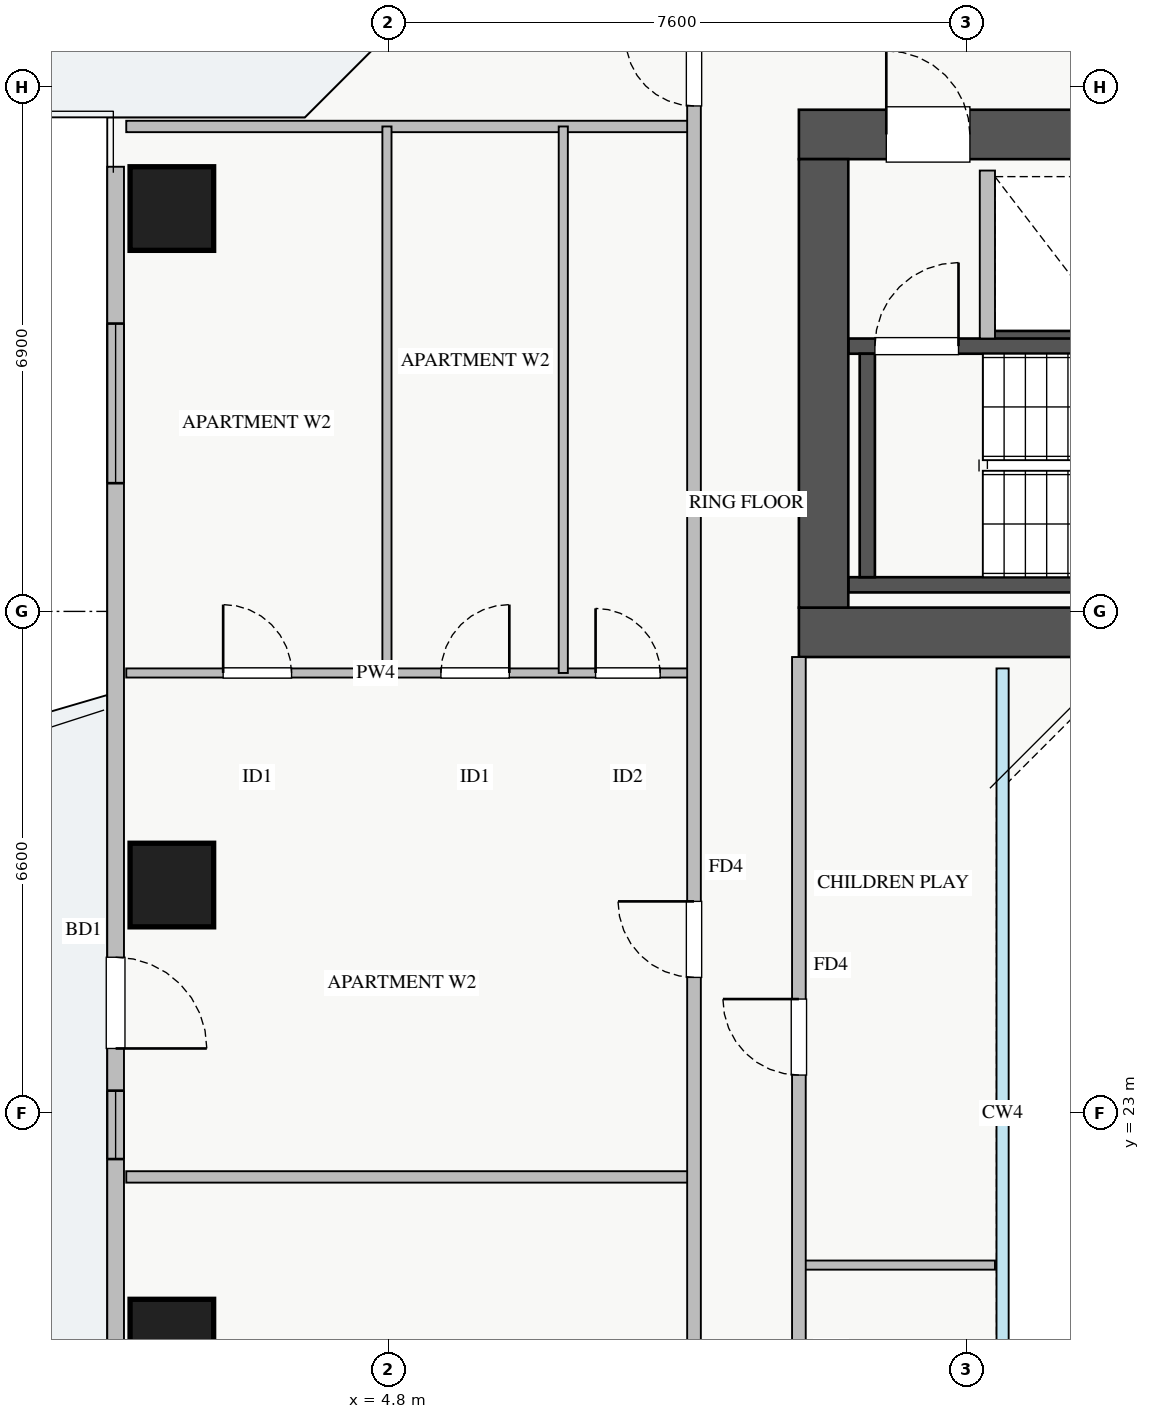
"""IFC4 building model, lengths in metres.
Left out: names, types, materials, properties, quantities, classifications, styles, units other than length and angle.
Written with IfcOpenShell. Run it as: python <this file> out.ifc"""

import sys

from ifc_helpers import new_model, si_unit, direction, frame, frame_2d, origin, origin_2d, place, context, subcontext, project, spatial, rectangle, extrude, source, transform, mapped, element, fill, save


model = new_model("IFC4")
c1 = context("Model", 3, precision=1e-05, world=origin(), true_north=direction((0.0, 1.0)))
c2 = subcontext(c1, "Body", "Model", "MODEL_VIEW")
j1 = project(units=[si_unit("LENGTHUNIT", "METRE"), si_unit("PLANEANGLEUNIT", "RADIAN")], contexts=[c1])
p1 = place(None, origin())
s1 = spatial("IfcSite", under=j1, at=p1, CompositionType="ELEMENT")
p2 = place(p1, origin())
s2 = spatial("IfcBuilding", under=s1, at=p2, CompositionType="ELEMENT")
p3 = place(p2, frame((0.0, 0.0, 132.75)))
s3 = spatial("IfcBuildingStorey", under=s2, at=p3, CompositionType="ELEMENT", Elevation=132.75)
p4 = place(p3, frame((12.68, 33.2, 0.0), z_axis=(0.0, 0.0, 1.0), x_axis=(1.0, 0.0, 0.0)))
e1 = element("IfcWall", 1, at=p4, inside=s3, PredefinedType="SHEAR", context=c2, shape_type="SweptSolid", body=[
    extrude(rectangle(XDim=1.94, YDim=0.18, at=frame_2d((0.97, 0.0))), origin(), (0.0, 0.0, 1.0), 3.07),
])
p5 = place(p3, frame((10.85, 29.95, 0.0), z_axis=(0.0, 0.0, 1.0), x_axis=(1.0, 0.0, 0.0)))
e2 = element("IfcWall", 2, at=p5, inside=s3, PredefinedType="SHEAR", context=c2, shape_type="SweptSolid", body=[
    extrude(rectangle(XDim=7.3, YDim=0.2, at=frame_2d((3.65, 0.0))), origin(), (0.0, 0.0, 1.0), 3.25),
])
p6 = place(p3, frame((10.85, 33.09, 0.0), z_axis=(0.0, 0.0, 1.0), x_axis=(1.0, 0.0, 0.0)))
e3 = element("IfcWall", 3, at=p6, inside=s3, PredefinedType="SHEAR", context=c2, shape_type="SweptSolid", body=[
    extrude(rectangle(XDim=7.3, YDim=0.2, at=frame_2d((3.65, 0.0))), origin(), (0.0, 0.0, 1.0), 3.25),
])
p7 = place(p6, frame((0.35, 0.0, 0.0)))
e4 = element("IfcOpeningElement", 4, at=p7, cuts=e3, PredefinedType="OPENING", context=c2, shape_type="SweptSolid", body=[
    extrude(rectangle(XDim=1.1, YDim=2.05, at=frame_2d((0.55, 1.025))), frame((0.0, 0.11, 0.0), z_axis=(0.0, -1.0, 0.0), x_axis=(1.0, 0.0, 0.0)), (0.0, 0.0, 1.0), 0.22),
])
p8 = place(p3, frame((11.1, 30.05, 0.0), z_axis=(0.0, 0.0, 1.0), x_axis=(0.0, 1.0, 0.0)))
e5 = element("IfcWall", 5, at=p8, inside=s3, PredefinedType="SHEAR", context=c2, shape_type="SweptSolid", body=[
    extrude(rectangle(XDim=2.94, YDim=0.2, at=frame_2d((1.47, 0.0))), origin(), (0.0, 0.0, 1.0), 3.25),
])
p9 = place(p3, frame((10.2, 29.325, 0.0), z_axis=(0.0, 0.0, 1.0), x_axis=(1.0, 0.0, 0.0)))
e6 = element("IfcWall", 6, at=p9, inside=s3, PredefinedType="SHEAR", context=c2, shape_type="SweptSolid", body=[
    extrude(rectangle(XDim=17.6, YDim=0.65, at=frame_2d((8.8, 0.0))), origin(), (0.0, 0.0, 1.0), 3.25),
])
p10 = place(p3, frame((10.2, 35.875, 0.0), z_axis=(0.0, 0.0, 1.0), x_axis=(1.0, 0.0, 0.0)))
e7 = element("IfcWall", 7, at=p10, inside=s3, PredefinedType="SHEAR", context=c2, shape_type="SweptSolid", body=[
    extrude(rectangle(XDim=17.6, YDim=0.65, at=frame_2d((8.8, 0.0))), origin(), (0.0, 0.0, 1.0), 3.25),
])
p11 = place(p10, frame((1.15, 0.0, 0.0)))
e8 = element("IfcOpeningElement", 8, at=p11, cuts=e7, PredefinedType="OPENING", context=c2, shape_type="SweptSolid", body=[
    extrude(rectangle(XDim=1.1, YDim=2.05, at=frame_2d((0.55, 1.025))), frame((0.0, 0.335, 0.0), z_axis=(0.0, -1.0, 0.0), x_axis=(1.0, 0.0, 0.0)), (0.0, 0.0, 1.0), 0.67),
])
p12 = place(p10, frame((8.3, 0.0, 0.0)))
e9 = element("IfcOpeningElement", 9, at=p12, cuts=e7, PredefinedType="OPENING", context=c2, shape_type="SweptSolid", body=[
    extrude(rectangle(XDim=1.1, YDim=2.05, at=frame_2d((0.55, 1.025))), frame((0.0, 0.335, 0.0), z_axis=(0.0, -1.0, 0.0), x_axis=(1.0, 0.0, 0.0)), (0.0, 0.0, 1.0), 0.67),
])
p13 = place(p10, frame((4.9, 0.0, 0.0)))
e10 = element("IfcOpeningElement", 10, at=p13, cuts=e7, PredefinedType="OPENING", context=c2, shape_type="SweptSolid", body=[
    extrude(rectangle(XDim=1.1, YDim=2.05, at=frame_2d((0.55, 1.025))), frame((0.0, 0.335, 0.0), z_axis=(0.0, -1.0, 0.0), x_axis=(1.0, 0.0, 0.0)), (0.0, 0.0, 1.0), 0.67),
])
p14 = place(p10, frame((14.74, 0.0, 0.0)))
e11 = element("IfcOpeningElement", 11, at=p14, cuts=e7, PredefinedType="OPENING", context=c2, shape_type="SweptSolid", body=[
    extrude(rectangle(XDim=1.0, YDim=2.05, at=frame_2d((0.5, 1.025))), frame((0.0, 0.335, 0.0), z_axis=(0.0, -1.0, 0.0), x_axis=(1.0, 0.0, 0.0)), (0.0, 0.0, 1.0), 0.67),
])
p15 = place(p10, frame((10.005, 0.0, 0.0)))
e12 = element("IfcOpeningElement", 12, at=p15, cuts=e7, PredefinedType="OPENING", context=c2, shape_type="SweptSolid", body=[
    extrude(rectangle(XDim=1.0, YDim=2.05, at=frame_2d((0.5, 1.025))), frame((0.0, 0.335, 0.0), z_axis=(0.0, -1.0, 0.0), x_axis=(1.0, 0.0, 0.0)), (0.0, 0.0, 1.0), 0.67),
])
p16 = place(p10, frame((11.55, 0.0, 0.0)))
e13 = element("IfcOpeningElement", 13, at=p16, cuts=e7, PredefinedType="OPENING", context=c2, shape_type="SweptSolid", body=[
    extrude(rectangle(XDim=1.0, YDim=2.05, at=frame_2d((0.5, 1.025))), frame((0.0, 0.335, 0.0), z_axis=(0.0, -1.0, 0.0), x_axis=(1.0, 0.0, 0.0)), (0.0, 0.0, 1.0), 0.67),
])
p17 = place(p10, frame((13.215, 0.0, 0.0)))
e14 = element("IfcOpeningElement", 14, at=p17, cuts=e7, PredefinedType="OPENING", context=c2, shape_type="SweptSolid", body=[
    extrude(rectangle(XDim=1.0, YDim=2.05, at=frame_2d((0.5, 1.025))), frame((0.0, 0.335, 0.0), z_axis=(0.0, -1.0, 0.0), x_axis=(1.0, 0.0, 0.0)), (0.0, 0.0, 1.0), 0.67),
])
p18 = place(p3, frame((10.525, 29.65, 0.0), z_axis=(0.0, 0.0, 1.0), x_axis=(0.0, 1.0, 0.0)))
e15 = element("IfcWall", 15, at=p18, inside=s3, PredefinedType="SHEAR", context=c2, shape_type="SweptSolid", body=[
    extrude(rectangle(XDim=5.9, YDim=0.65, at=frame_2d((2.95, 0.0))), origin(), (0.0, 0.0, 1.0), 3.25),
])
m1 = source(origin(), c2, "Body", "SweptSolid", [
    extrude(rectangle(XDim=1.1, YDim=1.1, at=origin_2d()), origin(), (0.0, 0.0, 1.0), 3.25),
])
for number, where, z_axis, x_axis in (
    (16, (1.95, 34.9, 0.0), (0.0, 0.0, 1.0), (1.0, 0.0, 0.0)),
    (17, (1.95, 26.0, 0.0), (0.0, 0.0, 1.0), (1.0, 0.0, 0.0)),
    (18, (1.95, 20.0, 0.0), (0.0, 0.0, 1.0), (1.0, 0.0, 0.0)),
):
    element("IfcColumn", number, at=place(p3, frame(where, z_axis=z_axis, x_axis=x_axis)), inside=s3, PredefinedType="COLUMN", context=c2, shape_type="MappedRepresentation", body=[
        mapped(m1, transform((0.0, 0.0, 0.0), x_axis=(1.0, 0.0, 0.0), y_axis=(0.0, 1.0, 0.0), z_axis=(0.0, 0.0, 1.0), scale=1.0)),
    ])
p19 = place(p3, frame((1.21, 10.55, 0.0), z_axis=(0.0, 0.0, 1.0), x_axis=(0.0, 1.0, 0.0)))
e19 = element("IfcWall", 19, at=p19, inside=s3, PredefinedType="STANDARD", context=c2, shape_type="SweptSolid", body=[
    extrude(rectangle(XDim=24.9, YDim=0.22, at=frame_2d((12.45, 0.0))), origin(), (0.0, 0.0, 1.0), 2.61),
])
p20 = place(p19, frame((13.3, 0.0, 0.0)))
e20 = element("IfcOpeningElement", 20, at=p20, cuts=e19, PredefinedType="OPENING", context=c2, shape_type="SweptSolid", body=[
    extrude(rectangle(XDim=1.2, YDim=2.1, at=frame_2d((0.6, 1.05))), frame((0.0, 0.12, 0.0), z_axis=(0.0, -1.0, 0.0), x_axis=(1.0, 0.0, 0.0)), (0.0, 0.0, 1.0), 0.24),
])
p21 = place(p19, frame((1.912, 0.0, 0.9)))
e21 = element("IfcOpeningElement", 21, at=p21, cuts=e19, PredefinedType="OPENING", context=c2, shape_type="SweptSolid", body=[
    extrude(rectangle(XDim=2.4, YDim=1.48, at=frame_2d((1.2, 0.74))), frame((0.0, 0.12, 0.0), z_axis=(0.0, -1.0, 0.0), x_axis=(1.0, 0.0, 0.0)), (0.0, 0.0, 1.0), 0.24),
])
p22 = place(p19, frame((20.737, 0.0, 0.9)))
e22 = element("IfcOpeningElement", 22, at=p22, cuts=e19, PredefinedType="OPENING", context=c2, shape_type="SweptSolid", body=[
    extrude(rectangle(XDim=2.1, YDim=1.48, at=frame_2d((1.05, 0.74))), frame((0.0, 0.12, 0.0), z_axis=(0.0, -1.0, 0.0), x_axis=(1.0, 0.0, 0.0)), (0.0, 0.0, 1.0), 0.24),
])
p23 = place(p19, frame((11.845, 0.0, 0.9)))
e23 = element("IfcOpeningElement", 23, at=p23, cuts=e19, PredefinedType="OPENING", context=c2, shape_type="SweptSolid", body=[
    extrude(rectangle(XDim=0.9, YDim=1.2, at=frame_2d((0.45, 0.6))), frame((0.0, 0.12, 0.0), z_axis=(0.0, -1.0, 0.0), x_axis=(1.0, 0.0, 0.0)), (0.0, 0.0, 1.0), 0.24),
])
p24 = place(p3, frame((12.68, 33.19, 0.0), z_axis=(0.0, 0.0, 1.0), x_axis=(0.0, 1.0, 0.0)))
e24 = element("IfcWall", 24, at=p24, inside=s3, PredefinedType="PARTITIONING", context=c2, shape_type="SweptSolid", body=[
    extrude(rectangle(XDim=2.21, YDim=0.2, at=frame_2d((1.105, 0.0))), origin(), (0.0, 0.0, 1.0), 3.07),
])
p25 = place(p3, frame((1.35, 35.98, 0.0), z_axis=(0.0, 0.0, 1.0), x_axis=(1.0, 0.0, 0.0)))
e25 = element("IfcWall", 25, at=p25, inside=s3, PredefinedType="PARTITIONING", context=c2, shape_type="SweptSolid", body=[
    extrude(rectangle(XDim=7.47, YDim=0.15, at=frame_2d((3.735, 0.0))), origin(), (0.0, 0.0, 1.0), 3.07),
])
p26 = place(p3, frame((1.35, 28.79, 0.0), z_axis=(0.0, 0.0, 1.0), x_axis=(1.0, 0.0, 0.0)))
e26 = element("IfcWall", 26, at=p26, inside=s3, PredefinedType="PLUMBINGWALL", context=c2, shape_type="SweptSolid", body=[
    extrude(rectangle(XDim=7.47, YDim=0.12, at=frame_2d((3.735, 0.0))), origin(), (0.0, 0.0, 1.0), 3.07),
])
p27 = place(p26, frame((1.275, 0.0, 0.0)))
e27 = element("IfcOpeningElement", 27, at=p27, cuts=e26, PredefinedType="OPENING", context=c2, shape_type="SweptSolid", body=[
    extrude(rectangle(XDim=0.9, YDim=2.05, at=frame_2d((0.45, 1.025))), frame((0.0, 0.07, 0.0), z_axis=(0.0, -1.0, 0.0), x_axis=(1.0, 0.0, 0.0)), (0.0, 0.0, 1.0), 0.14),
])
p28 = place(p26, frame((4.14, 0.0, 0.0)))
e28 = element("IfcOpeningElement", 28, at=p28, cuts=e26, PredefinedType="OPENING", context=c2, shape_type="SweptSolid", body=[
    extrude(rectangle(XDim=0.9, YDim=2.05, at=frame_2d((0.45, 1.025))), frame((0.0, 0.07, 0.0), z_axis=(0.0, -1.0, 0.0), x_axis=(1.0, 0.0, 0.0)), (0.0, 0.0, 1.0), 0.14),
])
p29 = place(p26, frame((6.175, 0.0, 0.0)))
e29 = element("IfcOpeningElement", 29, at=p29, cuts=e26, PredefinedType="OPENING", context=c2, shape_type="SweptSolid", body=[
    extrude(rectangle(XDim=0.85, YDim=2.05, at=frame_2d((0.425, 1.025))), frame((0.0, 0.07, 0.0), z_axis=(0.0, -1.0, 0.0), x_axis=(1.0, 0.0, 0.0)), (0.0, 0.0, 1.0), 0.14),
])
p30 = place(p3, frame((4.78, 28.79, 0.0), z_axis=(0.0, 0.0, 1.0), x_axis=(0.0, 1.0, 0.0)))
e30 = element("IfcWall", 30, at=p30, inside=s3, PredefinedType="PLUMBINGWALL", context=c2, shape_type="SweptSolid", body=[
    extrude(rectangle(XDim=7.19, YDim=0.12, at=frame_2d((3.595, 0.0))), origin(), (0.0, 0.0, 1.0), 3.07),
])
p31 = place(p3, frame((7.1, 28.79, 0.0), z_axis=(0.0, 0.0, 1.0), x_axis=(0.0, 1.0, 0.0)))
e31 = element("IfcWall", 31, at=p31, inside=s3, PredefinedType="PLUMBINGWALL", context=c2, shape_type="SweptSolid", body=[
    extrude(rectangle(XDim=7.19, YDim=0.12, at=frame_2d((3.595, 0.0))), origin(), (0.0, 0.0, 1.0), 2.577),
])
p32 = place(p3, frame((1.35, 22.16, 0.0), z_axis=(0.0, 0.0, 1.0), x_axis=(1.0, 0.0, 0.0)))
e32 = element("IfcWall", 32, at=p32, inside=s3, PredefinedType="PARTITIONING", context=c2, shape_type="SweptSolid", body=[
    extrude(rectangle(XDim=7.47, YDim=0.15, at=frame_2d((3.735, 0.0))), origin(), (0.0, 0.0, 1.0), 3.07),
])
p33 = place(p3, frame((8.82, 8.31, 0.0), z_axis=(0.0, 0.0, 1.0), x_axis=(0.0, 1.0, 0.0)))
e33 = element("IfcWall", 33, at=p33, inside=s3, PredefinedType="PARTITIONING", context=c2, shape_type="SweptSolid", body=[
    extrude(rectangle(XDim=29.13, YDim=0.18, at=frame_2d((14.565, 0.0))), origin(), (0.0, 0.0, 1.0), 3.07),
])
p34 = place(p33, frame((27.94, 0.0, 0.0)))
e34 = element("IfcOpeningElement", 34, at=p34, cuts=e33, PredefinedType="OPENING", context=c2, shape_type="SweptSolid", body=[
    extrude(rectangle(XDim=0.9, YDim=2.05, at=frame_2d((0.45, 1.025))), frame((0.0, 0.1, 0.0), z_axis=(0.0, -1.0, 0.0), x_axis=(1.0, 0.0, 0.0)), (0.0, 0.0, 1.0), 0.2),
])
p35 = place(p33, frame((0.24, 0.0, 0.0)))
e35 = element("IfcOpeningElement", 35, at=p35, cuts=e33, PredefinedType="OPENING", context=c2, shape_type="SweptSolid", body=[
    extrude(rectangle(XDim=0.9, YDim=2.05, at=frame_2d((0.45, 1.025))), frame((0.0, 0.1, 0.0), z_axis=(0.0, -1.0, 0.0), x_axis=(1.0, 0.0, 0.0)), (0.0, 0.0, 1.0), 0.2),
])
p36 = place(p33, frame((7.105, 0.0, 0.0)))
e36 = element("IfcOpeningElement", 36, at=p36, cuts=e33, PredefinedType="OPENING", context=c2, shape_type="SweptSolid", body=[
    extrude(rectangle(XDim=1.0, YDim=2.05, at=frame_2d((0.5, 1.025))), frame((0.0, 0.1, 0.0), z_axis=(0.0, -1.0, 0.0), x_axis=(1.0, 0.0, 0.0)), (0.0, 0.0, 1.0), 0.2),
])
p37 = place(p33, frame((16.475, 0.0, 0.0)))
e37 = element("IfcOpeningElement", 37, at=p37, cuts=e33, PredefinedType="OPENING", context=c2, shape_type="SweptSolid", body=[
    extrude(rectangle(XDim=1.0, YDim=2.05, at=frame_2d((0.5, 1.025))), frame((0.0, 0.1, 0.0), z_axis=(0.0, -1.0, 0.0), x_axis=(1.0, 0.0, 0.0)), (0.0, 0.0, 1.0), 0.2),
])
p38 = place(p3, frame((10.2, 21.0, 0.0), z_axis=(0.0, 0.0, 1.0), x_axis=(1.0, 0.0, 0.0)))
e38 = element("IfcWall", 38, at=p38, inside=s3, PredefinedType="PLUMBINGWALL", context=c2, shape_type="SweptSolid", body=[
    extrude(rectangle(XDim=2.58, YDim=0.12, at=frame_2d((1.29, 0.0))), origin(), (0.0, 0.0, 1.0), 3.07),
])
p39 = place(p3, frame((10.2, 17.0, 0.0), z_axis=(0.0, 0.0, 1.0), x_axis=(0.0, 1.0, 0.0)))
e39 = element("IfcWall", 39, at=p39, inside=s3, PredefinedType="PARTITIONING", context=c2, shape_type="SweptSolid", body=[
    extrude(rectangle(XDim=12.0, YDim=0.18, at=frame_2d((6.0, 0.0))), origin(), (0.0, 0.0, 1.0), 3.07),
])
p40 = place(p39, frame((1.5, 0.0, 0.0)))
e40 = element("IfcOpeningElement", 40, at=p40, cuts=e39, PredefinedType="OPENING", context=c2, shape_type="SweptSolid", body=[
    extrude(rectangle(XDim=0.85, YDim=2.05, at=frame_2d((0.425, 1.025))), frame((0.0, 0.1, 0.0), z_axis=(0.0, -1.0, 0.0), x_axis=(1.0, 0.0, 0.0)), (0.0, 0.0, 1.0), 0.2),
])
p41 = place(p39, frame((6.5, 0.0, 0.0)))
e41 = element("IfcOpeningElement", 41, at=p41, cuts=e39, PredefinedType="OPENING", context=c2, shape_type="SweptSolid", body=[
    extrude(rectangle(XDim=1.0, YDim=2.05, at=frame_2d((0.5, 1.025))), frame((0.0, 0.1, 0.0), z_axis=(0.0, -1.0, 0.0), x_axis=(1.0, 0.0, 0.0)), (0.0, 0.0, 1.0), 0.2),
])
m2 = source(origin(), c2, "Body", "SweptSolid", [
    extrude(rectangle(XDim=1.2, YDim=2.1, at=frame_2d((0.6, 1.05))), frame((0.0, 0.025, 0.0), z_axis=(0.0, -1.0, 0.0), x_axis=(1.0, 0.0, 0.0)), (0.0, 0.0, 1.0), 0.05),
])
p42 = place(p20, frame((1.2, 0.0, 0.0), z_axis=(0.0, 0.0, 1.0), x_axis=(-1.0, 0.0, 0.0)))
e42 = element("IfcDoor", 42, at=p42, inside=s3, OperationType="SINGLE_SWING_LEFT", PredefinedType="DOOR", context=c2, shape_type="MappedRepresentation", body=[
    mapped(m2, transform((0.0, 0.0, 0.0), x_axis=(1.0, 0.0, 0.0), y_axis=(0.0, 1.0, 0.0), z_axis=(0.0, 0.0, 1.0), scale=1.0)),
])
fill(e20, e42)
m3 = source(origin(), c2, "Body", "SweptSolid", [
    extrude(rectangle(XDim=2.1, YDim=1.48, at=frame_2d((1.05, 0.74))), frame((0.0, 0.03, 0.0), z_axis=(0.0, -1.0, 0.0), x_axis=(1.0, 0.0, 0.0)), (0.0, 0.0, 1.0), 0.06),
])
p43 = place(p22, origin())
e43 = element("IfcWindow", 43, at=p43, inside=s3, PartitioningType="TRIPLE_PANEL_VERTICAL", PredefinedType="WINDOW", context=c2, shape_type="MappedRepresentation", body=[
    mapped(m3, transform((0.0, 0.0, 0.0), x_axis=(1.0, 0.0, 0.0), y_axis=(0.0, 1.0, 0.0), z_axis=(0.0, 0.0, 1.0), scale=1.0)),
])
fill(e22, e43)
m4 = source(origin(), c2, "Body", "SweptSolid", [
    extrude(rectangle(XDim=1.1, YDim=2.05, at=frame_2d((0.55, 1.025))), frame((0.0, 0.025, 0.0), z_axis=(0.0, -1.0, 0.0), x_axis=(1.0, 0.0, 0.0)), (0.0, 0.0, 1.0), 0.05),
])
p44 = place(p11, origin())
e44 = element("IfcDoor", 44, at=p44, inside=s3, OperationType="SINGLE_SWING_LEFT", PredefinedType="DOOR", context=c2, shape_type="MappedRepresentation", body=[
    mapped(m4, transform((0.0, 0.0, 0.0), x_axis=(1.0, 0.0, 0.0), y_axis=(0.0, 1.0, 0.0), z_axis=(0.0, 0.0, 1.0), scale=1.0)),
])
fill(e8, e44)
p45 = place(p7, origin())
e45 = element("IfcDoor", 45, at=p45, inside=s3, OperationType="SINGLE_SWING_RIGHT", PredefinedType="DOOR", context=c2, shape_type="MappedRepresentation", body=[
    mapped(m4, transform((0.0, 0.0, 0.0), x_axis=(1.0, 0.0, 0.0), y_axis=(0.0, 1.0, 0.0), z_axis=(0.0, 0.0, 1.0), scale=1.0)),
])
fill(e4, e45)
m5 = source(origin(), c2, "Body", "SweptSolid", [
    extrude(rectangle(XDim=0.9, YDim=2.05, at=frame_2d((0.45, 1.025))), frame((0.0, 0.025, 0.0), z_axis=(0.0, -1.0, 0.0), x_axis=(1.0, 0.0, 0.0)), (0.0, 0.0, 1.0), 0.05),
])
p46 = place(p27, origin())
e46 = element("IfcDoor", 46, at=p46, inside=s3, OperationType="SINGLE_SWING_LEFT", PredefinedType="DOOR", context=c2, shape_type="MappedRepresentation", body=[
    mapped(m5, transform((0.0, 0.0, 0.0), x_axis=(1.0, 0.0, 0.0), y_axis=(0.0, 1.0, 0.0), z_axis=(0.0, 0.0, 1.0), scale=1.0)),
])
fill(e27, e46)
p47 = place(p28, origin())
e47 = element("IfcDoor", 47, at=p47, inside=s3, OperationType="SINGLE_SWING_RIGHT", PredefinedType="DOOR", context=c2, shape_type="MappedRepresentation", body=[
    mapped(m5, transform((0.0, 0.0, 0.0), x_axis=(1.0, 0.0, 0.0), y_axis=(0.0, 1.0, 0.0), z_axis=(0.0, 0.0, 1.0), scale=1.0)),
])
fill(e28, e47)
m6 = source(origin(), c2, "Body", "SweptSolid", [
    extrude(rectangle(XDim=0.85, YDim=2.05, at=frame_2d((0.425, 1.025))), frame((0.0, 0.025, 0.0), z_axis=(0.0, -1.0, 0.0), x_axis=(1.0, 0.0, 0.0)), (0.0, 0.0, 1.0), 0.05),
])
p48 = place(p29, origin())
e48 = element("IfcDoor", 48, at=p48, inside=s3, OperationType="SINGLE_SWING_LEFT", PredefinedType="DOOR", context=c2, shape_type="MappedRepresentation", body=[
    mapped(m6, transform((0.0, 0.0, 0.0), x_axis=(1.0, 0.0, 0.0), y_axis=(0.0, 1.0, 0.0), z_axis=(0.0, 0.0, 1.0), scale=1.0)),
])
fill(e29, e48)
p49 = place(p34, origin())
e49 = element("IfcDoor", 49, at=p49, inside=s3, OperationType="SINGLE_SWING_RIGHT", PredefinedType="DOOR", context=c2, shape_type="MappedRepresentation", body=[
    mapped(m5, transform((0.0, 0.0, 0.0), x_axis=(1.0, 0.0, 0.0), y_axis=(0.0, 1.0, 0.0), z_axis=(0.0, 0.0, 1.0), scale=1.0)),
])
fill(e34, e49)
m7 = source(origin(), c2, "Body", "SweptSolid", [
    extrude(rectangle(XDim=1.0, YDim=2.05, at=frame_2d((0.5, 1.025))), frame((0.0, 0.025, 0.0), z_axis=(0.0, -1.0, 0.0), x_axis=(1.0, 0.0, 0.0)), (0.0, 0.0, 1.0), 0.05),
])
p50 = place(p37, origin())
e50 = element("IfcDoor", 50, at=p50, inside=s3, OperationType="SINGLE_SWING_RIGHT", PredefinedType="DOOR", context=c2, shape_type="MappedRepresentation", body=[
    mapped(m7, transform((0.0, 0.0, 0.0), x_axis=(1.0, 0.0, 0.0), y_axis=(0.0, 1.0, 0.0), z_axis=(0.0, 0.0, 1.0), scale=1.0)),
])
fill(e37, e50)
p51 = place(p41, origin())
e51 = element("IfcDoor", 51, at=p51, inside=s3, OperationType="SINGLE_SWING_RIGHT", PredefinedType="DOOR", context=c2, shape_type="MappedRepresentation", body=[
    mapped(m7, transform((0.0, 0.0, 0.0), x_axis=(1.0, 0.0, 0.0), y_axis=(0.0, 1.0, 0.0), z_axis=(0.0, 0.0, 1.0), scale=1.0)),
])
fill(e41, e51)
m8 = source(origin(), c2, "Body", "SweptSolid", [
    extrude(rectangle(XDim=0.9, YDim=1.2, at=frame_2d((0.45, 0.6))), frame((0.0, 0.03, 0.0), z_axis=(0.0, -1.0, 0.0), x_axis=(1.0, 0.0, 0.0)), (0.0, 0.0, 1.0), 0.06),
])
p52 = place(p23, origin())
e52 = element("IfcWindow", 52, at=p52, inside=s3, PartitioningType="SINGLE_PANEL", PredefinedType="WINDOW", context=c2, shape_type="MappedRepresentation", body=[
    mapped(m8, transform((0.0, 0.0, 0.0), x_axis=(1.0, 0.0, 0.0), y_axis=(0.0, 1.0, 0.0), z_axis=(0.0, 0.0, 1.0), scale=1.0)),
])
fill(e23, e52)
save(model, sys.argv[1])
